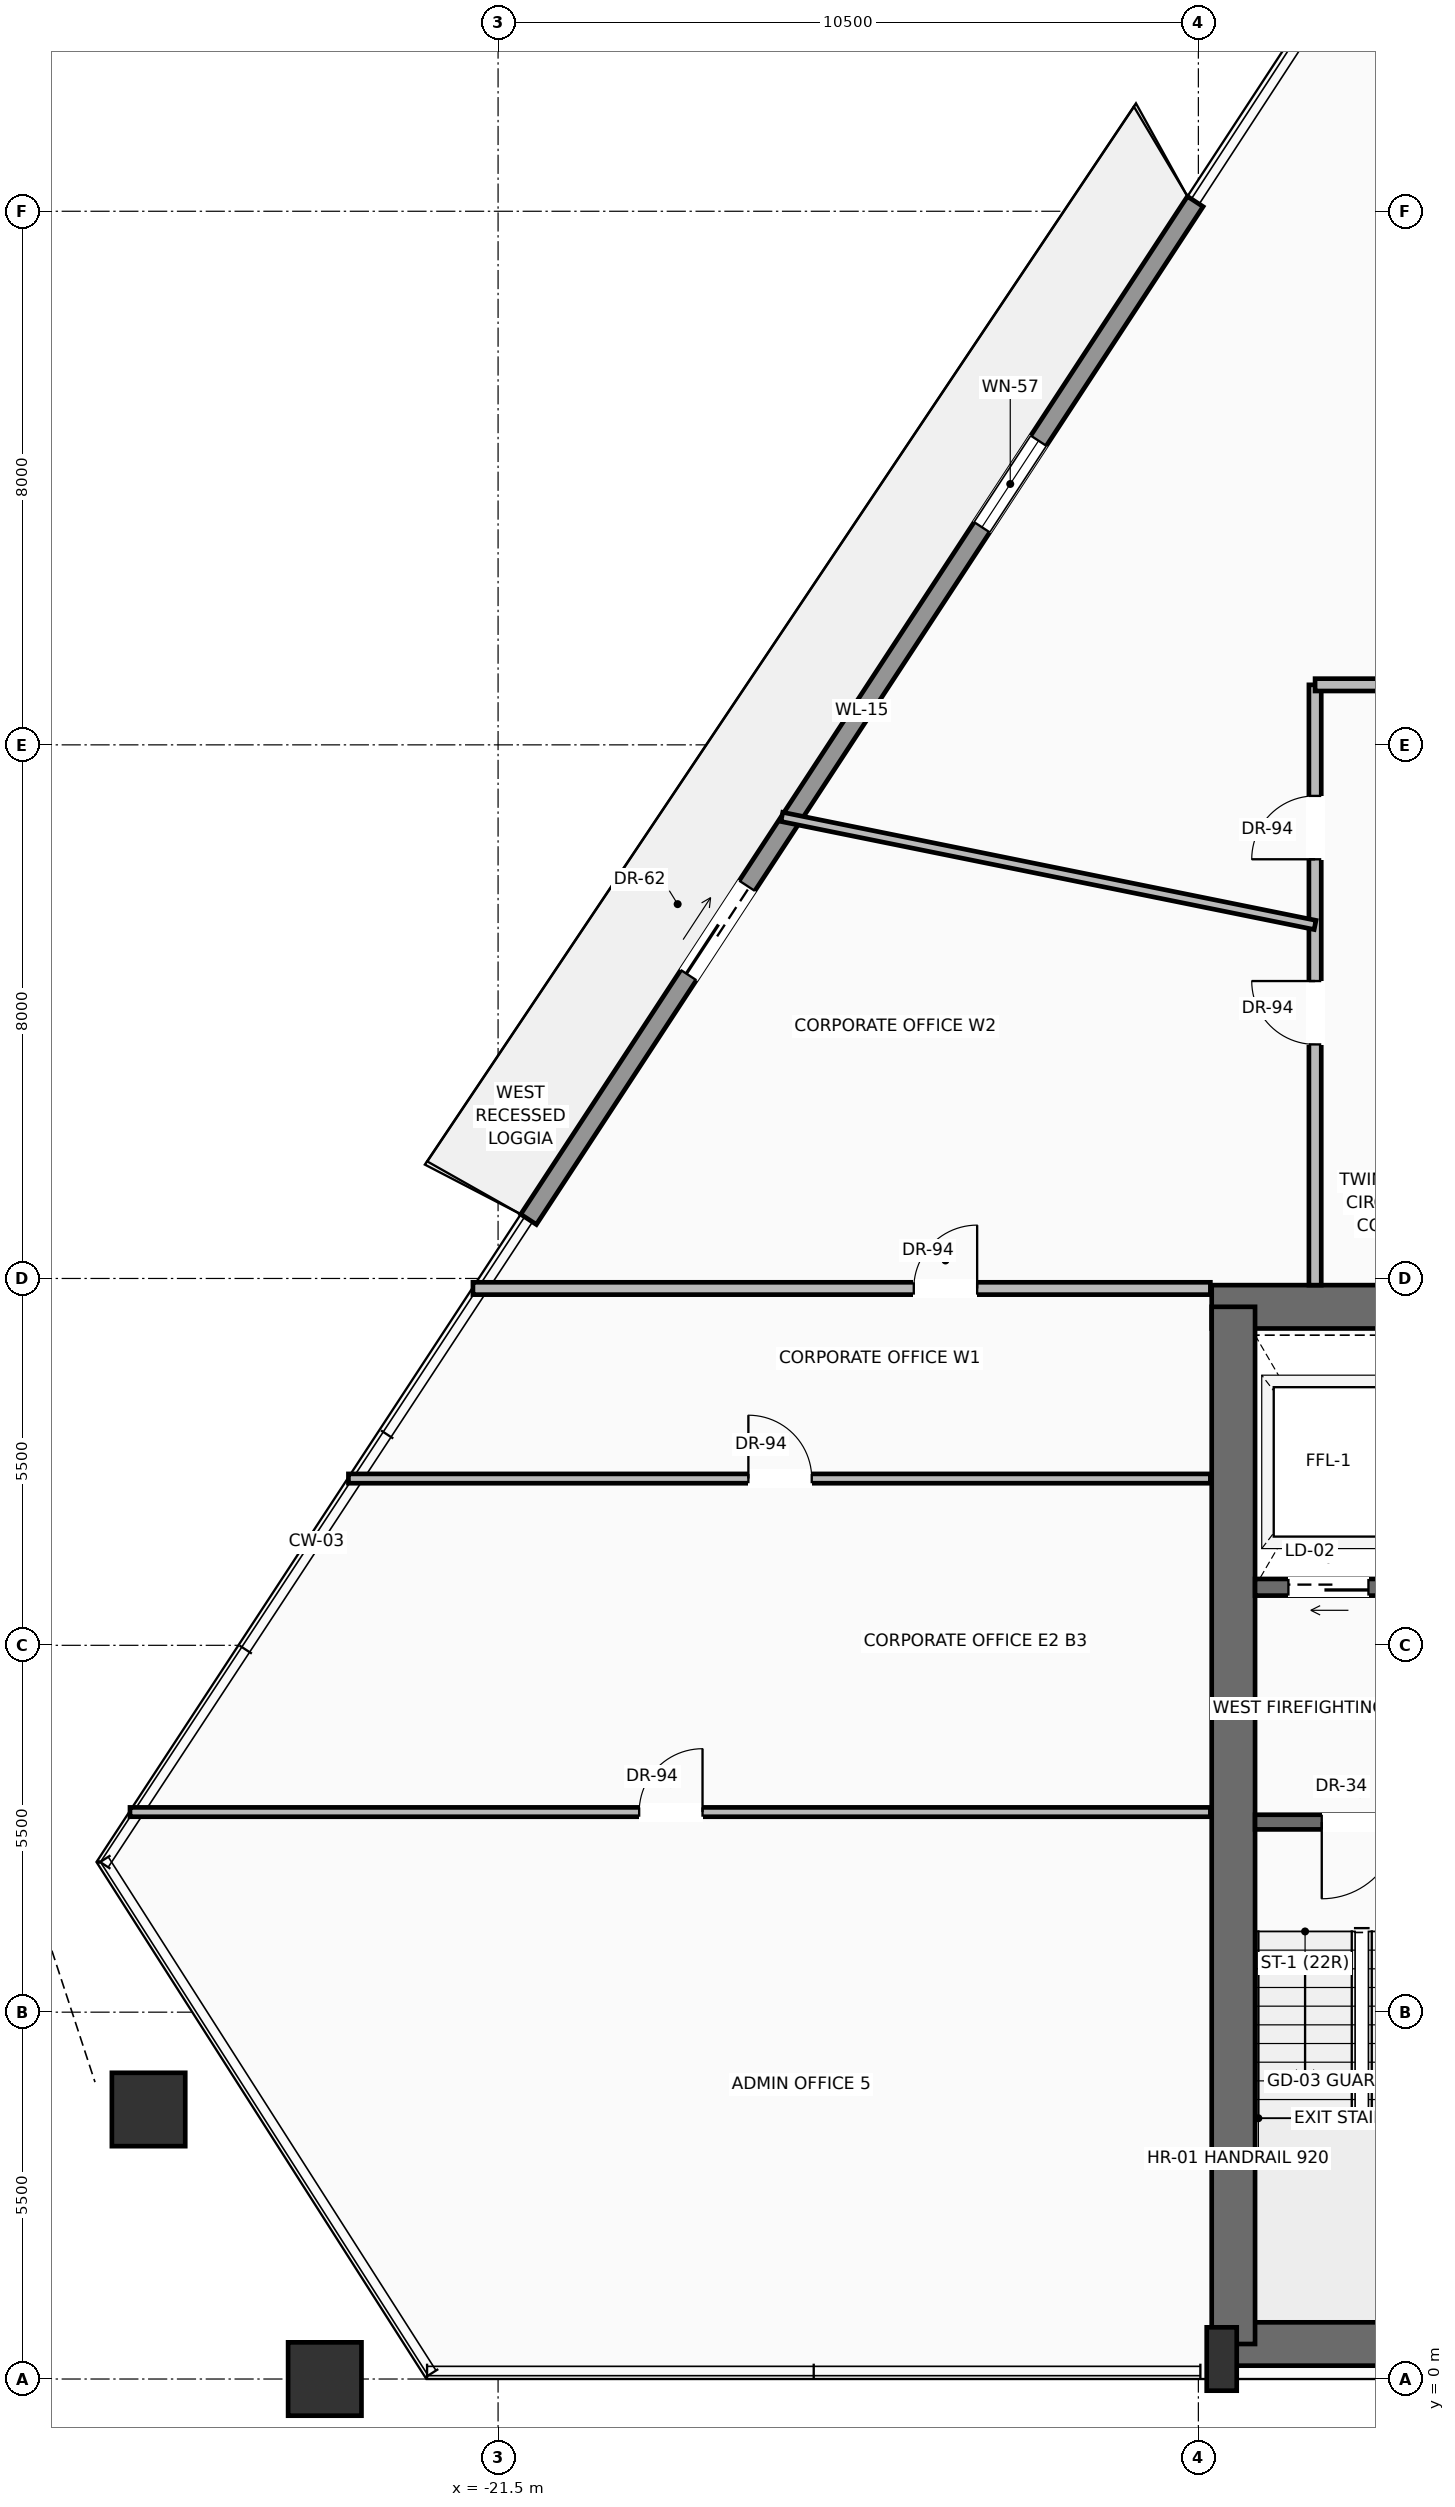
"""IFC4 building model, lengths in metres.
Left out: names, types, materials, properties, quantities, classifications, styles, units other than length and angle.
Written with IfcOpenShell. Run it as: python <this file> out.ifc"""

import sys

from ifc_helpers import new_model, si_unit, direction, frame, frame_2d, origin, origin_2d, place, context, subcontext, project, spatial, rectangle, hollow_rectangle, extrude, source, transform, mapped, element, fill, save


model = new_model("IFC4")
c1 = context("Model", 3, precision=1e-05, world=origin(), true_north=direction((0.0, 1.0)))
c2 = subcontext(c1, "Body", "Model", "MODEL_VIEW")
j1 = project(units=[si_unit("LENGTHUNIT", "METRE"), si_unit("PLANEANGLEUNIT", "RADIAN")], contexts=[c1])
p1 = place(None, origin())
s1 = spatial("IfcSite", under=j1, at=p1, CompositionType="ELEMENT")
p2 = place(p1, origin())
s2 = spatial("IfcBuilding", under=s1, at=p2, CompositionType="ELEMENT")
p3 = place(p2, frame((0.0, 0.0, 133.0)))
s3 = spatial("IfcBuildingStorey", under=s2, at=p3, CompositionType="ELEMENT", Elevation=133.0)
p4 = place(p3, frame((-10.65, 0.525, 0.0), z_axis=(0.0, 0.0, 1.0), x_axis=(1.0, 0.0, 0.0)))
e1 = element("IfcWall", 1, at=p4, inside=s3, PredefinedType="SHEAR", context=c2, shape_type="SweptSolid", body=[
    extrude(rectangle(XDim=21.3, YDim=0.65, at=frame_2d((10.65, 0.0))), origin(), (0.0, 0.0, 1.0), 3.47),
])
p5 = place(p3, frame((-10.8, 16.075, 0.0), z_axis=(0.0, 0.0, 1.0), x_axis=(1.0, 0.0, 0.0)))
e2 = element("IfcWall", 2, at=p5, inside=s3, PredefinedType="SHEAR", context=c2, shape_type="SweptSolid", body=[
    extrude(rectangle(XDim=21.6, YDim=0.65, at=frame_2d((10.8, 0.0))), origin(), (0.0, 0.0, 1.0), 3.47),
])
p6 = place(p5, frame((3.37, 0.0, 0.0)))
e3 = element("IfcOpeningElement", 3, at=p6, cuts=e2, PredefinedType="OPENING", context=c2, shape_type="SweptSolid", body=[
    extrude(rectangle(XDim=1.3, YDim=2.3, at=frame_2d((0.65, 1.15))), frame((0.0, 0.335, 0.0), z_axis=(0.0, -1.0, 0.0), x_axis=(1.0, 0.0, 0.0)), (0.0, 0.0, 1.0), 0.67),
])
p7 = place(p5, frame((9.8, 0.0, 0.0)))
e4 = element("IfcOpeningElement", 4, at=p7, cuts=e2, PredefinedType="OPENING", context=c2, shape_type="SweptSolid", body=[
    extrude(rectangle(XDim=2.0, YDim=2.4, at=frame_2d((1.0, 1.2))), frame((0.0, 0.335, 0.0), z_axis=(0.0, -1.0, 0.0), x_axis=(1.0, 0.0, 0.0)), (0.0, 0.0, 1.0), 0.67),
])
p8 = place(p3, frame((-10.475, 0.525, 0.0), z_axis=(0.0, 0.0, 1.0), x_axis=(0.0, 1.0, 0.0)))
e5 = element("IfcWall", 5, at=p8, inside=s3, PredefinedType="SHEAR", context=c2, shape_type="SweptSolid", body=[
    extrude(rectangle(XDim=15.55, YDim=0.65, at=frame_2d((7.775, 0.0))), origin(), (0.0, 0.0, 1.0), 3.47),
])
m1 = source(origin(), c2, "Body", "SweptSolid", [
    extrude(rectangle(XDim=0.45, YDim=0.95, at=origin_2d()), origin(), (0.0, 0.0, 1.0), 3.7),
])
p9 = place(p3, frame((-10.65, 0.3, 0.0), z_axis=(0.0, 0.0, 1.0), x_axis=(1.0, 0.0, 0.0)))
e6 = element("IfcColumn", 6, at=p9, inside=s3, PredefinedType="PILASTER", context=c2, shape_type="MappedRepresentation", body=[
    mapped(m1, transform((0.0, 0.0, 0.0), scale=1.0)),
])
m2 = source(origin(), c2, "Body", "SweptSolid", [
    extrude(hollow_rectangle(XDim=1.1, YDim=1.1, WallThickness=0.055, at=origin_2d()), origin(), (0.0, 0.0, 1.0), 3.691),
])
p10 = place(p3, frame((-24.098, 0.0, 0.004), z_axis=(-0.011375677672, 0.0, 0.999935294885), x_axis=(0.0, -1.0, 0.0)))
e7 = element("IfcColumn", 7, at=p10, inside=s3, PredefinedType="COLUMN", context=c2, shape_type="MappedRepresentation", body=[
    mapped(m2, transform((0.0, 0.0, 0.0), scale=1.0)),
])
m3 = source(origin(), c2, "Body", "SweptSolid", [
    extrude(hollow_rectangle(XDim=1.1, YDim=1.1, WallThickness=0.055, at=origin_2d()), origin(), (0.0, 0.0, 1.0), 3.692),
])
p11 = place(p3, frame((-26.74, 4.041, 0.004), z_axis=(-0.000330665917, -0.016268763123, 0.999867600238), x_axis=(0.999793507033, -0.020321006241, 0.0)))
e8 = element("IfcColumn", 8, at=p11, inside=s3, PredefinedType="COLUMN", context=c2, shape_type="MappedRepresentation", body=[
    mapped(m3, transform((0.0, 0.0, 0.0), scale=1.0)),
])
p12 = place(p3, frame((-21.043, 17.386, 0.0), z_axis=(0.0, 0.0, 1.0), x_axis=(0.547958773701, 0.836505339089, 0.0)))
e9 = element("IfcWall", 9, at=p12, inside=s3, PredefinedType="SOLIDWALL", context=c2, shape_type="SweptSolid", body=[
    extrude(rectangle(XDim=18.243, YDim=0.28, at=frame_2d((9.122, 0.0))), origin(), (0.0, 0.0, 1.0), 3.05),
])
p13 = place(p12, frame((4.378, 0.0, 0.0)))
e10 = element("IfcOpeningElement", 10, at=p13, cuts=e9, PredefinedType="OPENING", context=c2, shape_type="SweptSolid", body=[
    extrude(rectangle(XDim=1.6, YDim=2.35, at=frame_2d((0.8, 1.175))), frame((0.0, 0.15, 0.0), z_axis=(0.0, -1.0, 0.0), x_axis=(1.0, 0.0, 0.0)), (0.0, 0.0, 1.0), 0.3),
])
p14 = place(p12, frame((12.405, 0.0, 0.9)))
e11 = element("IfcOpeningElement", 11, at=p14, cuts=e9, PredefinedType="OPENING", context=c2, shape_type="SweptSolid", body=[
    extrude(rectangle(XDim=1.55, YDim=1.85, at=frame_2d((0.775, 0.925))), frame((0.0, 0.15, 0.0), z_axis=(0.0, -1.0, 0.0), x_axis=(1.0, 0.0, 0.0)), (0.0, 0.0, 1.0), 0.3),
])
p15 = place(p3, frame((-5.5, 8.35, 0.0), z_axis=(0.0, 0.0, 1.0), x_axis=(-1.0, 0.0, 0.0)))
e12 = element("IfcWall", 12, at=p15, inside=s3, PredefinedType="SOLIDWALL", context=c2, shape_type="SweptSolid", body=[
    extrude(rectangle(XDim=4.65, YDim=0.22, at=frame_2d((2.325, 0.0))), origin(), (0.0, 0.0, 1.0), 3.47),
])
p16 = place(p15, frame((2.5, 0.0, 0.0)))
e13 = element("IfcOpeningElement", 13, at=p16, cuts=e12, PredefinedType="OPENING", context=c2, shape_type="SweptSolid", body=[
    extrude(rectangle(XDim=1.15, YDim=2.2, at=frame_2d((0.575, 1.1))), frame((0.0, 0.12, 0.0), z_axis=(0.0, -1.0, 0.0), x_axis=(1.0, 0.0, 0.0)), (0.0, 0.0, 1.0), 0.24),
])
p17 = place(p3, frame((-5.5, 11.87, 0.0), z_axis=(0.0, 0.0, 1.0), x_axis=(-1.0, 0.0, 0.0)))
e14 = element("IfcWall", 14, at=p17, inside=s3, PredefinedType="SOLIDWALL", context=c2, shape_type="SweptSolid", body=[
    extrude(rectangle(XDim=4.65, YDim=0.25, at=frame_2d((2.325, 0.0))), origin(), (0.0, 0.0, 1.0), 3.47),
])
p18 = place(p17, frame((2.95, 0.0, 0.0)))
e15 = element("IfcOpeningElement", 15, at=p18, cuts=e14, PredefinedType="OPENING", context=c2, shape_type="SweptSolid", body=[
    extrude(rectangle(XDim=1.2, YDim=2.25, at=frame_2d((0.6, 1.125))), frame((0.0, 0.135, 0.0), z_axis=(0.0, -1.0, 0.0), x_axis=(1.0, 0.0, 0.0)), (0.0, 0.0, 1.0), 0.27),
])
p19 = place(p3, frame((-9.25, 16.4, 0.0), z_axis=(0.0, 0.0, 1.0), x_axis=(0.0, 1.0, 0.0)))
e16 = element("IfcWall", 16, at=p19, inside=s3, PredefinedType="PARTITIONING", context=c2, shape_type="SweptSolid", body=[
    extrude(rectangle(XDim=9.0, YDim=0.185, at=frame_2d((4.5, 0.0))), origin(), (0.0, 0.0, 1.0), 2.846),
])
p20 = place(p19, frame((3.609, 0.0, 0.0)))
e17 = element("IfcOpeningElement", 17, at=p20, cuts=e16, PredefinedType="OPENING", context=c2, shape_type="SweptSolid", body=[
    extrude(rectangle(XDim=0.95, YDim=2.2, at=frame_2d((0.475, 1.1))), frame((0.0, 0.103, 0.0), z_axis=(0.0, -1.0, 0.0), x_axis=(1.0, 0.0, 0.0)), (0.0, 0.0, 1.0), 0.205),
])
p21 = place(p19, frame((6.385, 0.0, 0.0)))
e18 = element("IfcOpeningElement", 18, at=p21, cuts=e16, PredefinedType="OPENING", context=c2, shape_type="SweptSolid", body=[
    extrude(rectangle(XDim=0.95, YDim=2.2, at=frame_2d((0.475, 1.1))), frame((0.0, 0.103, 0.0), z_axis=(0.0, -1.0, 0.0), x_axis=(1.0, 0.0, 0.0)), (0.0, 0.0, 1.0), 0.205),
])
p22 = place(p3, frame((-9.25, 25.4, 0.0), z_axis=(0.0, 0.0, 1.0), x_axis=(1.0, 0.0, 0.0)))
e19 = element("IfcWall", 19, at=p22, inside=s3, PredefinedType="PARTITIONING", context=c2, shape_type="SweptSolid", body=[
    extrude(rectangle(XDim=2.2, YDim=0.185, at=frame_2d((1.1, 0.0))), origin(), (0.0, 0.0, 1.0), 3.462),
])
p23 = place(p3, frame((-21.877, 16.35, 0.0), z_axis=(0.0, 0.0, 1.0), x_axis=(1.0, 0.0, 0.0)))
e20 = element("IfcWall", 20, at=p23, inside=s3, PredefinedType="PARTITIONING", context=c2, shape_type="SweptSolid", body=[
    extrude(rectangle(XDim=11.057, YDim=0.185, at=frame_2d((5.528, 0.0))), origin(), (0.0, 0.0, 1.0), 3.462),
])
p24 = place(p23, frame((6.61, 0.0, 0.0)))
e21 = element("IfcOpeningElement", 21, at=p24, cuts=e20, PredefinedType="OPENING", context=c2, shape_type="SweptSolid", body=[
    extrude(rectangle(XDim=0.95, YDim=2.2, at=frame_2d((0.475, 1.1))), frame((0.0, 0.103, 0.0), z_axis=(0.0, -1.0, 0.0), x_axis=(1.0, 0.0, 0.0)), (0.0, 0.0, 1.0), 0.205),
])
p25 = place(p3, frame((-27.019, 8.5, 0.0), z_axis=(0.0, 0.0, 1.0), x_axis=(1.0, 0.0, 0.0)))
e22 = element("IfcWall", 22, at=p25, inside=s3, PredefinedType="PARTITIONING", context=c2, shape_type="SweptSolid", body=[
    extrude(rectangle(XDim=16.199, YDim=0.14, at=frame_2d((8.1, 0.0))), origin(), (0.0, 0.0, 1.0), 3.462),
])
p26 = place(p25, frame((7.635, 0.0, 0.0)))
e23 = element("IfcOpeningElement", 23, at=p26, cuts=e22, PredefinedType="OPENING", context=c2, shape_type="SweptSolid", body=[
    extrude(rectangle(XDim=0.95, YDim=2.2, at=frame_2d((0.475, 1.1))), frame((0.0, 0.08, 0.0), z_axis=(0.0, -1.0, 0.0), x_axis=(1.0, 0.0, 0.0)), (0.0, 0.0, 1.0), 0.16),
])
p27 = place(p3, frame((-23.744, 13.5, 0.0), z_axis=(0.0, 0.0, 1.0), x_axis=(1.0, 0.0, 0.0)))
e24 = element("IfcWall", 24, at=p27, inside=s3, PredefinedType="PARTITIONING", context=c2, shape_type="SweptSolid", body=[
    extrude(rectangle(XDim=12.924, YDim=0.14, at=frame_2d((6.462, 0.0))), origin(), (0.0, 0.0, 1.0), 3.049),
])
p28 = place(p27, frame((5.997, 0.0, 0.0)))
e25 = element("IfcOpeningElement", 25, at=p28, cuts=e24, PredefinedType="OPENING", context=c2, shape_type="SweptSolid", body=[
    extrude(rectangle(XDim=0.95, YDim=2.2, at=frame_2d((0.475, 1.1))), frame((0.0, 0.08, 0.0), z_axis=(0.0, -1.0, 0.0), x_axis=(1.0, 0.0, 0.0)), (0.0, 0.0, 1.0), 0.16),
])
p29 = place(p3, frame((-17.246, 23.42, 0.0), z_axis=(0.0, 0.0, 1.0), x_axis=(0.980088444261, -0.198561429853, 0.0)))
e26 = element("IfcWall", 26, at=p29, inside=s3, PredefinedType="PARTITIONING", context=c2, shape_type="SweptSolid", body=[
    extrude(rectangle(XDim=8.158, YDim=0.14, at=frame_2d((4.079, 0.0))), origin(), (0.0, 0.0, 1.0), 3.049),
])
m4 = source(origin(), c2, "Body", "SweptSolid", [
    extrude(rectangle(XDim=1.6, YDim=2.35, at=frame_2d((0.8, 1.175))), frame((0.0, 0.025, 0.0), z_axis=(0.0, -1.0, 0.0), x_axis=(1.0, 0.0, 0.0)), (0.0, 0.0, 1.0), 0.05),
])
p30 = place(p13, origin())
e27 = element("IfcDoor", 27, at=p30, inside=s3, OperationType="SLIDING_TO_LEFT", PredefinedType="DOOR", context=c2, shape_type="MappedRepresentation", body=[
    mapped(m4, transform((0.0, 0.0, 0.0), scale=1.0)),
])
fill(e10, e27)
m5 = source(origin(), c2, "Body", "SweptSolid", [
    extrude(rectangle(XDim=1.55, YDim=1.85, at=frame_2d((0.775, 0.925))), frame((0.0, 0.03, 0.0), z_axis=(0.0, -1.0, 0.0), x_axis=(1.0, 0.0, 0.0)), (0.0, 0.0, 1.0), 0.06),
])
p31 = place(p14, origin())
e28 = element("IfcWindow", 28, at=p31, inside=s3, PartitioningType="SINGLE_PANEL", PredefinedType="WINDOW", context=c2, shape_type="MappedRepresentation", body=[
    mapped(m5, transform((0.0, 0.0, 0.0), scale=1.0)),
])
fill(e11, e28)
m6 = source(origin(), c2, "Body", "SweptSolid", [
    extrude(rectangle(XDim=1.15, YDim=2.2, at=frame_2d((0.575, 1.1))), frame((0.0, 0.025, 0.0), z_axis=(0.0, -1.0, 0.0), x_axis=(1.0, 0.0, 0.0)), (0.0, 0.0, 1.0), 0.05),
])
p32 = place(p16, origin())
e29 = element("IfcDoor", 29, at=p32, inside=s3, OperationType="SINGLE_SWING_RIGHT", PredefinedType="DOOR", context=c2, shape_type="MappedRepresentation", body=[
    mapped(m6, transform((0.0, 0.0, 0.0), scale=1.0)),
])
fill(e13, e29)
m7 = source(origin(), c2, "Body", "SweptSolid", [
    extrude(rectangle(XDim=1.2, YDim=2.25, at=frame_2d((0.6, 1.125))), frame((0.0, 0.025, 0.0), z_axis=(0.0, -1.0, 0.0), x_axis=(1.0, 0.0, 0.0)), (0.0, 0.0, 1.0), 0.05),
])
p33 = place(p18, origin())
e30 = element("IfcDoor", 30, at=p33, inside=s3, OperationType="SLIDING_TO_LEFT", PredefinedType="DOOR", context=c2, shape_type="MappedRepresentation", body=[
    mapped(m7, transform((0.0, 0.0, 0.0), scale=1.0)),
])
fill(e15, e30)
m8 = source(origin(), c2, "Body", "SweptSolid", [
    extrude(rectangle(XDim=0.95, YDim=2.2, at=frame_2d((0.475, 1.1))), frame((0.0, 0.025, 0.0), z_axis=(0.0, -1.0, 0.0), x_axis=(1.0, 0.0, 0.0)), (0.0, 0.0, 1.0), 0.05),
])
p34 = place(p20, origin())
e31 = element("IfcDoor", 31, at=p34, inside=s3, OperationType="SINGLE_SWING_RIGHT", PredefinedType="DOOR", context=c2, shape_type="MappedRepresentation", body=[
    mapped(m8, transform((0.0, 0.0, 0.0), scale=1.0)),
])
fill(e17, e31)
p35 = place(p24, origin())
e32 = element("IfcDoor", 32, at=p35, inside=s3, OperationType="SINGLE_SWING_RIGHT", PredefinedType="DOOR", context=c2, shape_type="MappedRepresentation", body=[
    mapped(m8, transform((0.0, 0.0, 0.0), scale=1.0)),
])
fill(e21, e32)
p36 = place(p28, origin())
e33 = element("IfcDoor", 33, at=p36, inside=s3, OperationType="SINGLE_SWING_LEFT", PredefinedType="DOOR", context=c2, shape_type="MappedRepresentation", body=[
    mapped(m8, transform((0.0, 0.0, 0.0), scale=1.0)),
])
fill(e25, e33)
p37 = place(p21, origin())
e34 = element("IfcDoor", 34, at=p37, inside=s3, OperationType="SINGLE_SWING_LEFT", PredefinedType="DOOR", context=c2, shape_type="MappedRepresentation", body=[
    mapped(m8, transform((0.0, 0.0, 0.0), scale=1.0)),
])
fill(e18, e34)
p38 = place(p26, origin())
e35 = element("IfcDoor", 35, at=p38, inside=s3, OperationType="SINGLE_SWING_RIGHT", PredefinedType="DOOR", context=c2, shape_type="MappedRepresentation", body=[
    mapped(m8, transform((0.0, 0.0, 0.0), scale=1.0)),
])
fill(e23, e35)
save(model, sys.argv[1])
